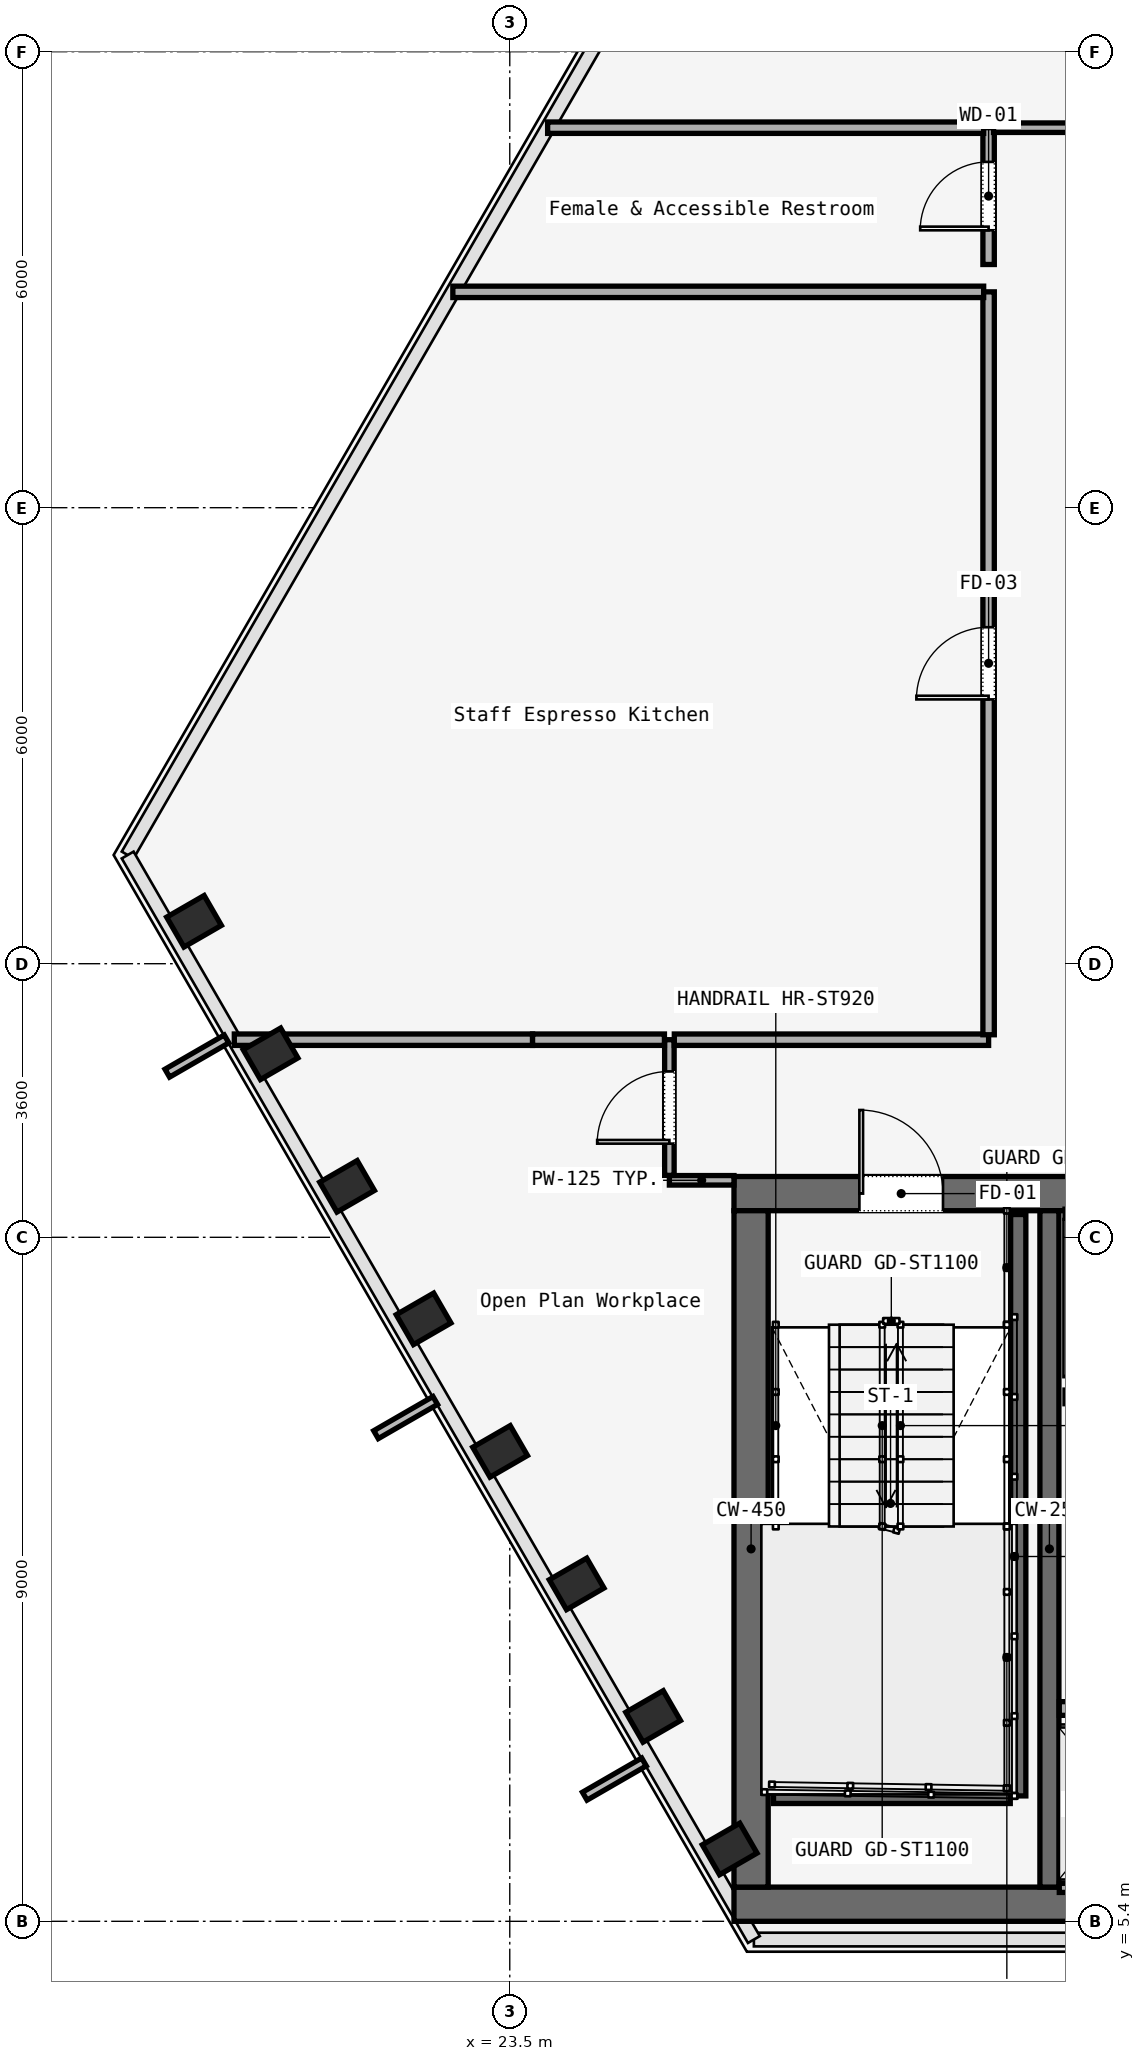
"""IFC4 building model, lengths in metres.
Left out: names, types, materials, properties, quantities, classifications, styles, units other than length and angle.
Written with IfcOpenShell. Run it as: python <this file> out.ifc"""

import sys

from ifc_helpers import new_model, si_unit, direction, frame, frame_2d, origin, origin_2d, place, context, subcontext, project, spatial, rectangle, i_section, extrude, element, fill, save


model = new_model("IFC4")
c1 = context("Model", 3, precision=1e-05, world=origin(), true_north=direction((0.0, 1.0)))
c2 = subcontext(c1, "Body", "Model", "MODEL_VIEW")
j1 = project(units=[si_unit("LENGTHUNIT", "METRE"), si_unit("PLANEANGLEUNIT", "RADIAN")], contexts=[c1])
p1 = place(None, origin())
s1 = spatial("IfcSite", under=j1, at=p1, CompositionType="ELEMENT")
p2 = place(p1, origin())
s2 = spatial("IfcBuilding", under=s1, at=p2, CompositionType="ELEMENT")
p3 = place(p2, frame((0.0, 0.0, 43.6)))
s3 = spatial("IfcBuildingStorey", under=s2, at=p3, CompositionType="ELEMENT", Elevation=43.6)
p4 = place(p3, frame((26.45, 14.975, 0.0), z_axis=(0.0, 0.0, 1.0), x_axis=(1.0, 0.0, 0.0)))
e1 = element("IfcWall", 1, at=p4, inside=s3, PredefinedType="SOLIDWALL", context=c2, shape_type="SweptSolid", body=[
    extrude(rectangle(XDim=31.1, YDim=0.45, at=frame_2d((15.55, 0.0))), origin(), (0.0, 0.0, 1.0), 3.58),
])
p5 = place(p4, frame((1.65, 0.0, 0.0)))
e2 = element("IfcOpeningElement", 2, at=p5, cuts=e1, PredefinedType="OPENING", context=c2, shape_type="SweptSolid", body=[
    extrude(rectangle(XDim=1.1, YDim=2.2, at=frame_2d((0.55, 1.1))), frame((0.0, 0.225, 0.0), z_axis=(0.0, -1.0, 0.0), x_axis=(1.0, 0.0, 0.0)), (0.0, 0.0, 1.0), 0.45),
])
p6 = place(p4, frame((13.65, 0.0, 0.0)))
e3 = element("IfcOpeningElement", 3, at=p6, cuts=e1, PredefinedType="OPENING", context=c2, shape_type="SweptSolid", body=[
    extrude(rectangle(XDim=1.1, YDim=2.2, at=frame_2d((0.55, 1.1))), frame((0.0, 0.225, 0.0), z_axis=(0.0, -1.0, 0.0), x_axis=(1.0, 0.0, 0.0)), (0.0, 0.0, 1.0), 0.45),
])
p7 = place(p4, frame((25.55, 0.0, 0.0)))
e4 = element("IfcOpeningElement", 4, at=p7, cuts=e1, PredefinedType="OPENING", context=c2, shape_type="SweptSolid", body=[
    extrude(rectangle(XDim=1.1, YDim=2.2, at=frame_2d((0.55, 1.1))), frame((0.0, 0.225, 0.0), z_axis=(0.0, -1.0, 0.0), x_axis=(1.0, 0.0, 0.0)), (0.0, 0.0, 1.0), 0.45),
])
p8 = place(p4, frame((10.7, 0.0, 0.0)))
e5 = element("IfcOpeningElement", 5, at=p8, cuts=e1, PredefinedType="OPENING", context=c2, shape_type="SweptSolid", body=[
    extrude(rectangle(XDim=1.4, YDim=2.2, at=frame_2d((0.7, 1.1))), frame((0.0, 0.225, 0.0), z_axis=(0.0, -1.0, 0.0), x_axis=(1.0, 0.0, 0.0)), (0.0, 0.0, 1.0), 0.45),
])
p9 = place(p4, frame((19.35, 0.0, 0.0)))
e6 = element("IfcOpeningElement", 6, at=p9, cuts=e1, PredefinedType="OPENING", context=c2, shape_type="SweptSolid", body=[
    extrude(rectangle(XDim=1.1, YDim=2.2, at=frame_2d((0.55, 1.1))), frame((0.0, 0.225, 0.0), z_axis=(0.0, -1.0, 0.0), x_axis=(1.0, 0.0, 0.0)), (0.0, 0.0, 1.0), 0.45),
])
p10 = place(p4, frame((21.4, 0.0, 0.0)))
e7 = element("IfcOpeningElement", 7, at=p10, cuts=e1, PredefinedType="OPENING", context=c2, shape_type="SweptSolid", body=[
    extrude(rectangle(XDim=0.9, YDim=2.1, at=frame_2d((0.45, 1.05))), frame((0.0, 0.225, 0.0), z_axis=(0.0, -1.0, 0.0), x_axis=(1.0, 0.0, 0.0)), (0.0, 0.0, 1.0), 0.45),
])
p11 = place(p4, frame((23.35, 0.0, 0.0)))
e8 = element("IfcOpeningElement", 8, at=p11, cuts=e1, PredefinedType="OPENING", context=c2, shape_type="SweptSolid", body=[
    extrude(rectangle(XDim=1.3, YDim=2.3, at=frame_2d((0.65, 1.15))), frame((0.0, 0.225, 0.0), z_axis=(0.0, -1.0, 0.0), x_axis=(1.0, 0.0, 0.0)), (0.0, 0.0, 1.0), 0.45),
])
p12 = place(p3, frame((26.45, 5.625, 0.0), z_axis=(0.0, 0.0, 1.0), x_axis=(1.0, 0.0, 0.0)))
e9 = element("IfcWall", 9, at=p12, inside=s3, PredefinedType="SOLIDWALL", context=c2, shape_type="SweptSolid", body=[
    extrude(rectangle(XDim=31.1, YDim=0.45, at=frame_2d((15.55, 0.0))), origin(), (0.0, 0.0, 1.0), 3.58),
])
p13 = place(p3, frame((26.675, 5.85, 0.0), z_axis=(0.0, 0.0, 1.0), x_axis=(0.0, 1.0, 0.0)))
e10 = element("IfcWall", 10, at=p13, inside=s3, PredefinedType="SOLIDWALL", context=c2, shape_type="SweptSolid", body=[
    extrude(rectangle(XDim=8.9, YDim=0.45, at=frame_2d((4.45, 0.0))), origin(), (0.0, 0.0, 1.0), 3.58),
])
p14 = place(p3, frame((30.6, 5.85, 0.0), z_axis=(0.0, 0.0, 1.0), x_axis=(0.0, 1.0, 0.0)))
e11 = element("IfcWall", 11, at=p14, inside=s3, PredefinedType="SOLIDWALL", context=c2, shape_type="SweptSolid", body=[
    extrude(rectangle(XDim=8.9, YDim=0.25, at=frame_2d((4.45, 0.0))), origin(), (0.0, 0.0, 1.0), 3.58),
])
p15 = place(p3, frame((19.346, 18.558, 0.0), z_axis=(0.005427503727, -0.101765694887, 0.994793589418), x_axis=(-0.545172741525, 0.833665038285, 0.088256930829)))
e12 = element("IfcColumn", 12, at=p15, inside=s3, PredefinedType="COLUMN", context=c2, shape_type="SweptSolid", body=[
    extrude(i_section(OverallWidth=0.454, OverallDepth=0.569, WebThickness=0.078, FlangeThickness=0.08, FilletRadius=0.015, at=origin_2d()), origin(), (0.0, 0.0, 1.0), 3.599),
])
p16 = place(p3, frame((20.353, 16.814, 0.0), z_axis=(-0.002377627447, -0.088311876593, 0.99609003576), x_axis=(-0.476602394605, 0.875783464655, 0.076508042027)))
e13 = element("IfcColumn", 13, at=p16, inside=s3, PredefinedType="COLUMN", context=c2, shape_type="SweptSolid", body=[
    extrude(i_section(OverallWidth=0.454, OverallDepth=0.569, WebThickness=0.078, FlangeThickness=0.08, FilletRadius=0.015, at=origin_2d()), origin(), (0.0, 0.0, 1.0), 3.594),
])
p17 = place(p3, frame((21.359, 15.071, 0.0), z_axis=(-0.010200686453, -0.074737029415, 0.997151103108), x_axis=(-0.378624510243, 0.923242233688, 0.065324254129)))
e14 = element("IfcColumn", 14, at=p17, inside=s3, PredefinedType="COLUMN", context=c2, shape_type="SweptSolid", body=[
    extrude(i_section(OverallWidth=0.454, OverallDepth=0.569, WebThickness=0.078, FlangeThickness=0.08, FilletRadius=0.015, at=origin_2d()), origin(), (0.0, 0.0, 1.0), 3.59),
])
p18 = place(p3, frame((22.366, 13.327, 0.0), z_axis=(-0.018103855794, -0.061253647423, 0.997958035732), x_axis=(-0.234534805675, 0.970532640224, 0.055315632401)))
e15 = element("IfcColumn", 15, at=p18, inside=s3, PredefinedType="COLUMN", context=c2, shape_type="SweptSolid", body=[
    extrude(i_section(OverallWidth=0.454, OverallDepth=0.569, WebThickness=0.078, FlangeThickness=0.08, FilletRadius=0.015, at=origin_2d()), origin(), (0.0, 0.0, 1.0), 3.587),
])
p19 = place(p3, frame((23.373, 11.583, 0.0), z_axis=(-0.025945557191, -0.047600904137, 0.998529409676), x_axis=(-0.025159853701, 0.998580351425, 0.046949584763)))
e16 = element("IfcColumn", 16, at=p19, inside=s3, PredefinedType="COLUMN", context=c2, shape_type="SweptSolid", body=[
    extrude(i_section(OverallWidth=0.454, OverallDepth=0.569, WebThickness=0.078, FlangeThickness=0.08, FilletRadius=0.015, at=origin_2d()), origin(), (0.0, 0.0, 1.0), 3.585),
])
p20 = place(p3, frame((24.38, 9.839, 0.0), z_axis=(-0.033855728951, -0.034060089488, 0.998846184315), x_axis=(0.255206953934, 0.965991555659, 0.041589963441)))
e17 = element("IfcColumn", 17, at=p20, inside=s3, PredefinedType="COLUMN", context=c2, shape_type="SweptSolid", body=[
    extrude(i_section(OverallWidth=0.454, OverallDepth=0.569, WebThickness=0.078, FlangeThickness=0.08, FilletRadius=0.015, at=origin_2d()), origin(), (0.0, 0.0, 1.0), 3.584),
])
p21 = place(p3, frame((25.386, 8.096, 0.0), z_axis=(-0.041692690137, -0.020437593205, 0.998921430531), x_axis=(0.556704828438, 0.829736555946, 0.040211711232)))
e18 = element("IfcColumn", 18, at=p21, inside=s3, PredefinedType="COLUMN", context=c2, shape_type="SweptSolid", body=[
    extrude(i_section(OverallWidth=0.454, OverallDepth=0.569, WebThickness=0.078, FlangeThickness=0.08, FilletRadius=0.015, at=origin_2d()), origin(), (0.0, 0.0, 1.0), 3.584),
])
p22 = place(p3, frame((26.393, 6.352, 0.0), z_axis=(-0.049518600028, -0.006811361764, 0.998749975521), x_axis=(0.78874036788, 0.613200429939, 0.043288160025)))
e19 = element("IfcColumn", 19, at=p22, inside=s3, PredefinedType="COLUMN", context=c2, shape_type="SweptSolid", body=[
    extrude(i_section(OverallWidth=0.454, OverallDepth=0.569, WebThickness=0.078, FlangeThickness=0.08, FilletRadius=0.015, at=origin_2d()), origin(), (0.0, 0.0, 1.0), 3.584),
])
p23 = place(p3, frame((30.19, 14.7, 0.0), z_axis=(0.0, 0.0, 1.0), x_axis=(0.0, -1.0, 0.0)))
e20 = element("IfcWall", 20, at=p23, inside=s3, PredefinedType="SOLIDWALL", context=c2, shape_type="SweptSolid", body=[
    extrude(rectangle(XDim=7.65, YDim=0.2, at=frame_2d((3.825, 0.0))), origin(), (0.0, 0.0, 1.0), 3.8),
])
p24 = place(p3, frame((26.97, 7.05, 0.0), z_axis=(0.0, 0.0, 1.0), x_axis=(1.0, 0.0, 0.0)))
e21 = element("IfcWall", 21, at=p24, inside=s3, PredefinedType="SOLIDWALL", context=c2, shape_type="SweptSolid", body=[
    extrude(rectangle(XDim=3.115, YDim=0.2, at=frame_2d((1.558, 0.0))), origin(), (0.0, 0.0, 1.0), 3.8),
])
p25 = place(p3, frame((30.73, 8.2, 0.0), z_axis=(0.0, 0.0, 1.0), x_axis=(1.0, 0.0, 0.0)))
e22 = element("IfcWall", 22, at=p25, inside=s3, PredefinedType="SOLIDWALL", context=c2, shape_type="SweptSolid", body=[
    extrude(rectangle(XDim=1.665, YDim=0.18, at=frame_2d((0.833, 0.0))), origin(), (0.0, 0.0, 1.0), 2.933),
])
p26 = place(p25, frame((0.282, 0.0, 0.0)))
e23 = element("IfcOpeningElement", 23, at=p26, cuts=e22, PredefinedType="OPENING", context=c2, shape_type="SweptSolid", body=[
    extrude(rectangle(XDim=1.1, YDim=2.2, at=frame_2d((0.55, 1.1))), frame((0.0, 0.09, 0.0), z_axis=(0.0, -1.0, 0.0), x_axis=(1.0, 0.0, 0.0)), (0.0, 0.0, 1.0), 0.18),
])
p27 = place(p3, frame((30.73, 5.84, 0.0), z_axis=(0.0, 0.0, 1.0), x_axis=(1.0, 0.0, 0.0)))
e24 = element("IfcWall", 24, at=p27, inside=s3, PredefinedType="SOLIDWALL", context=c2, shape_type="SweptSolid", body=[
    extrude(rectangle(XDim=1.665, YDim=0.12, at=frame_2d((0.833, 0.0))), origin(), (0.0, 0.0, 1.0), 2.933),
])
p28 = place(p3, frame((26.45, 15.15, 0.0), z_axis=(0.0, 0.0, 1.0), x_axis=(-1.0, 0.0, 0.0)))
e25 = element("IfcWall", 25, at=p28, inside=s3, PredefinedType="PARTITIONING", context=c2, shape_type="SweptSolid", body=[
    extrude(rectangle(XDim=0.85, YDim=0.125, at=frame_2d((0.425, 0.0))), origin(), (0.0, 0.0, 1.0), 2.933),
])
p29 = place(p3, frame((25.6, 15.215, 0.0), z_axis=(0.0, 0.0, 1.0), x_axis=(0.0, 1.0, 0.0)))
e26 = element("IfcWall", 26, at=p29, inside=s3, PredefinedType="PARTITIONING", context=c2, shape_type="SweptSolid", body=[
    extrude(rectangle(XDim=1.785, YDim=0.125, at=frame_2d((0.893, 0.0))), origin(), (0.0, 0.0, 1.0), 2.933),
])
p30 = place(p29, frame((0.417, 0.0, 0.0)))
e27 = element("IfcOpeningElement", 27, at=p30, cuts=e26, PredefinedType="OPENING", context=c2, shape_type="SweptSolid", body=[
    extrude(rectangle(XDim=0.95, YDim=2.2, at=frame_2d((0.475, 1.1))), frame((0.0, 0.062, 0.0), z_axis=(0.0, -1.0, 0.0), x_axis=(1.0, 0.0, 0.0)), (0.0, 0.0, 1.0), 0.125),
])
p31 = place(p3, frame((25.665, 17.0, 0.0), z_axis=(0.0, 0.0, 1.0), x_axis=(1.0, 0.0, 0.0)))
e28 = element("IfcWall", 28, at=p31, inside=s3, PredefinedType="PARTITIONING", context=c2, shape_type="SweptSolid", body=[
    extrude(rectangle(XDim=4.135, YDim=0.15, at=frame_2d((2.067, 0.0))), origin(), (0.0, 0.0, 1.0), 2.933),
])
p32 = place(p3, frame((29.8, 17.065, 0.0), z_axis=(0.0, 0.0, 1.0), x_axis=(0.0, 1.0, 0.0)))
e29 = element("IfcWall", 29, at=p32, inside=s3, PredefinedType="PARTITIONING", context=c2, shape_type="SweptSolid", body=[
    extrude(rectangle(XDim=9.775, YDim=0.15, at=frame_2d((4.888, 0.0))), origin(), (0.0, 0.0, 1.0), 2.933),
])
p33 = place(p32, frame((4.413, 0.0, 0.0)))
e30 = element("IfcOpeningElement", 30, at=p33, cuts=e29, PredefinedType="OPENING", context=c2, shape_type="SweptSolid", body=[
    extrude(rectangle(XDim=0.95, YDim=2.2, at=frame_2d((0.475, 1.1))), frame((0.0, 0.075, 0.0), z_axis=(0.0, -1.0, 0.0), x_axis=(1.0, 0.0, 0.0)), (0.0, 0.0, 1.0), 0.15),
])
p34 = place(p3, frame((29.8, 27.2, 0.0), z_axis=(0.0, 0.0, 1.0), x_axis=(0.0, 1.0, 0.0)))
e31 = element("IfcWall", 31, at=p34, inside=s3, PredefinedType="PARTITIONING", context=c2, shape_type="SweptSolid", body=[
    extrude(rectangle(XDim=1.8, YDim=0.15, at=frame_2d((0.9, 0.0))), origin(), (0.0, 0.0, 1.0), 2.933),
])
p35 = place(p34, frame((0.45, 0.0, 0.0)))
e32 = element("IfcOpeningElement", 32, at=p35, cuts=e31, PredefinedType="OPENING", context=c2, shape_type="SweptSolid", body=[
    extrude(rectangle(XDim=0.9, YDim=2.15, at=frame_2d((0.45, 1.075))), frame((0.0, 0.075, 0.0), z_axis=(0.0, -1.0, 0.0), x_axis=(1.0, 0.0, 0.0)), (0.0, 0.0, 1.0), 0.15),
])
p36 = place(p3, frame((29.865, 29.0, 0.0), z_axis=(0.0, 0.0, 1.0), x_axis=(1.0, 0.0, 0.0)))
e33 = element("IfcWall", 33, at=p36, inside=s3, PredefinedType="PARTITIONING", context=c2, shape_type="SweptSolid", body=[
    extrude(rectangle(XDim=1.735, YDim=0.125, at=frame_2d((0.868, 0.0))), origin(), (0.0, 0.0, 1.0), 2.933),
])
p37 = place(p3, frame((19.876, 17.0, 0.0), z_axis=(0.0, 0.0, 1.0), x_axis=(1.0, 0.0, 0.0)))
e34 = element("IfcWall", 34, at=p37, inside=s3, PredefinedType="PARTITIONING", context=c2, shape_type="SweptSolid", body=[
    extrude(rectangle(XDim=3.924, YDim=0.15, at=frame_2d((1.962, 0.0))), origin(), (0.0, 0.0, 1.0), 2.933),
])
p38 = place(p3, frame((23.8, 17.0, 0.0), z_axis=(0.0, 0.0, 1.0), x_axis=(1.0, 0.0, 0.0)))
e35 = element("IfcWall", 35, at=p38, inside=s3, PredefinedType="PARTITIONING", context=c2, shape_type="SweptSolid", body=[
    extrude(rectangle(XDim=1.735, YDim=0.15, at=frame_2d((0.867, 0.0))), origin(), (0.0, 0.0, 1.0), 2.933),
])
p39 = place(p3, frame((22.751, 26.84, 0.0), z_axis=(0.0, 0.0, 1.0), x_axis=(1.0, 0.0, 0.0)))
e36 = element("IfcWall", 36, at=p39, inside=s3, PredefinedType="PARTITIONING", context=c2, shape_type="SweptSolid", body=[
    extrude(rectangle(XDim=6.984, YDim=0.15, at=frame_2d((3.492, 0.0))), origin(), (0.0, 0.0, 1.0), 2.933),
])
p40 = place(p3, frame((23.998, 29.0, 0.0), z_axis=(0.0, 0.0, 1.0), x_axis=(1.0, 0.0, 0.0)))
e37 = element("IfcWall", 37, at=p40, inside=s3, PredefinedType="PARTITIONING", context=c2, shape_type="SweptSolid", body=[
    extrude(rectangle(XDim=5.737, YDim=0.15, at=frame_2d((2.868, 0.0))), origin(), (0.0, 0.0, 1.0), 2.933),
])
p41 = place(p5, origin())
e38 = element("IfcDoor", 38, at=p41, inside=s3, OperationType="SINGLE_SWING_LEFT", PredefinedType="DOOR", context=c2, shape_type="SweptSolid", body=[
    extrude(rectangle(XDim=1.1, YDim=2.2, at=frame_2d((0.55, 1.1))), frame((0.0, 0.025, 0.0), z_axis=(0.0, -1.0, 0.0), x_axis=(1.0, 0.0, 0.0)), (0.0, 0.0, 1.0), 0.05),
])
fill(e2, e38)
p42 = place(p30, origin())
e39 = element("IfcDoor", 39, at=p42, inside=s3, OperationType="SINGLE_SWING_LEFT", PredefinedType="DOOR", context=c2, shape_type="SweptSolid", body=[
    extrude(rectangle(XDim=0.95, YDim=2.2, at=frame_2d((0.475, 1.1))), frame((0.0, 0.025, 0.0), z_axis=(0.0, -1.0, 0.0), x_axis=(1.0, 0.0, 0.0)), (0.0, 0.0, 1.0), 0.05),
])
fill(e27, e39)
p43 = place(p33, origin())
e40 = element("IfcDoor", 40, at=p43, inside=s3, OperationType="SINGLE_SWING_LEFT", PredefinedType="DOOR", context=c2, shape_type="SweptSolid", body=[
    extrude(rectangle(XDim=0.95, YDim=2.2, at=frame_2d((0.475, 1.1))), frame((0.0, 0.025, 0.0), z_axis=(0.0, -1.0, 0.0), x_axis=(1.0, 0.0, 0.0)), (0.0, 0.0, 1.0), 0.05),
])
fill(e30, e40)
p44 = place(p35, origin())
e41 = element("IfcDoor", 41, at=p44, inside=s3, OperationType="SINGLE_SWING_RIGHT", PredefinedType="DOOR", context=c2, shape_type="SweptSolid", body=[
    extrude(rectangle(XDim=0.9, YDim=2.15, at=frame_2d((0.45, 1.075))), frame((0.0, 0.025, 0.0), z_axis=(0.0, -1.0, 0.0), x_axis=(1.0, 0.0, 0.0)), (0.0, 0.0, 1.0), 0.05),
])
fill(e32, e41)
save(model, sys.argv[1])
